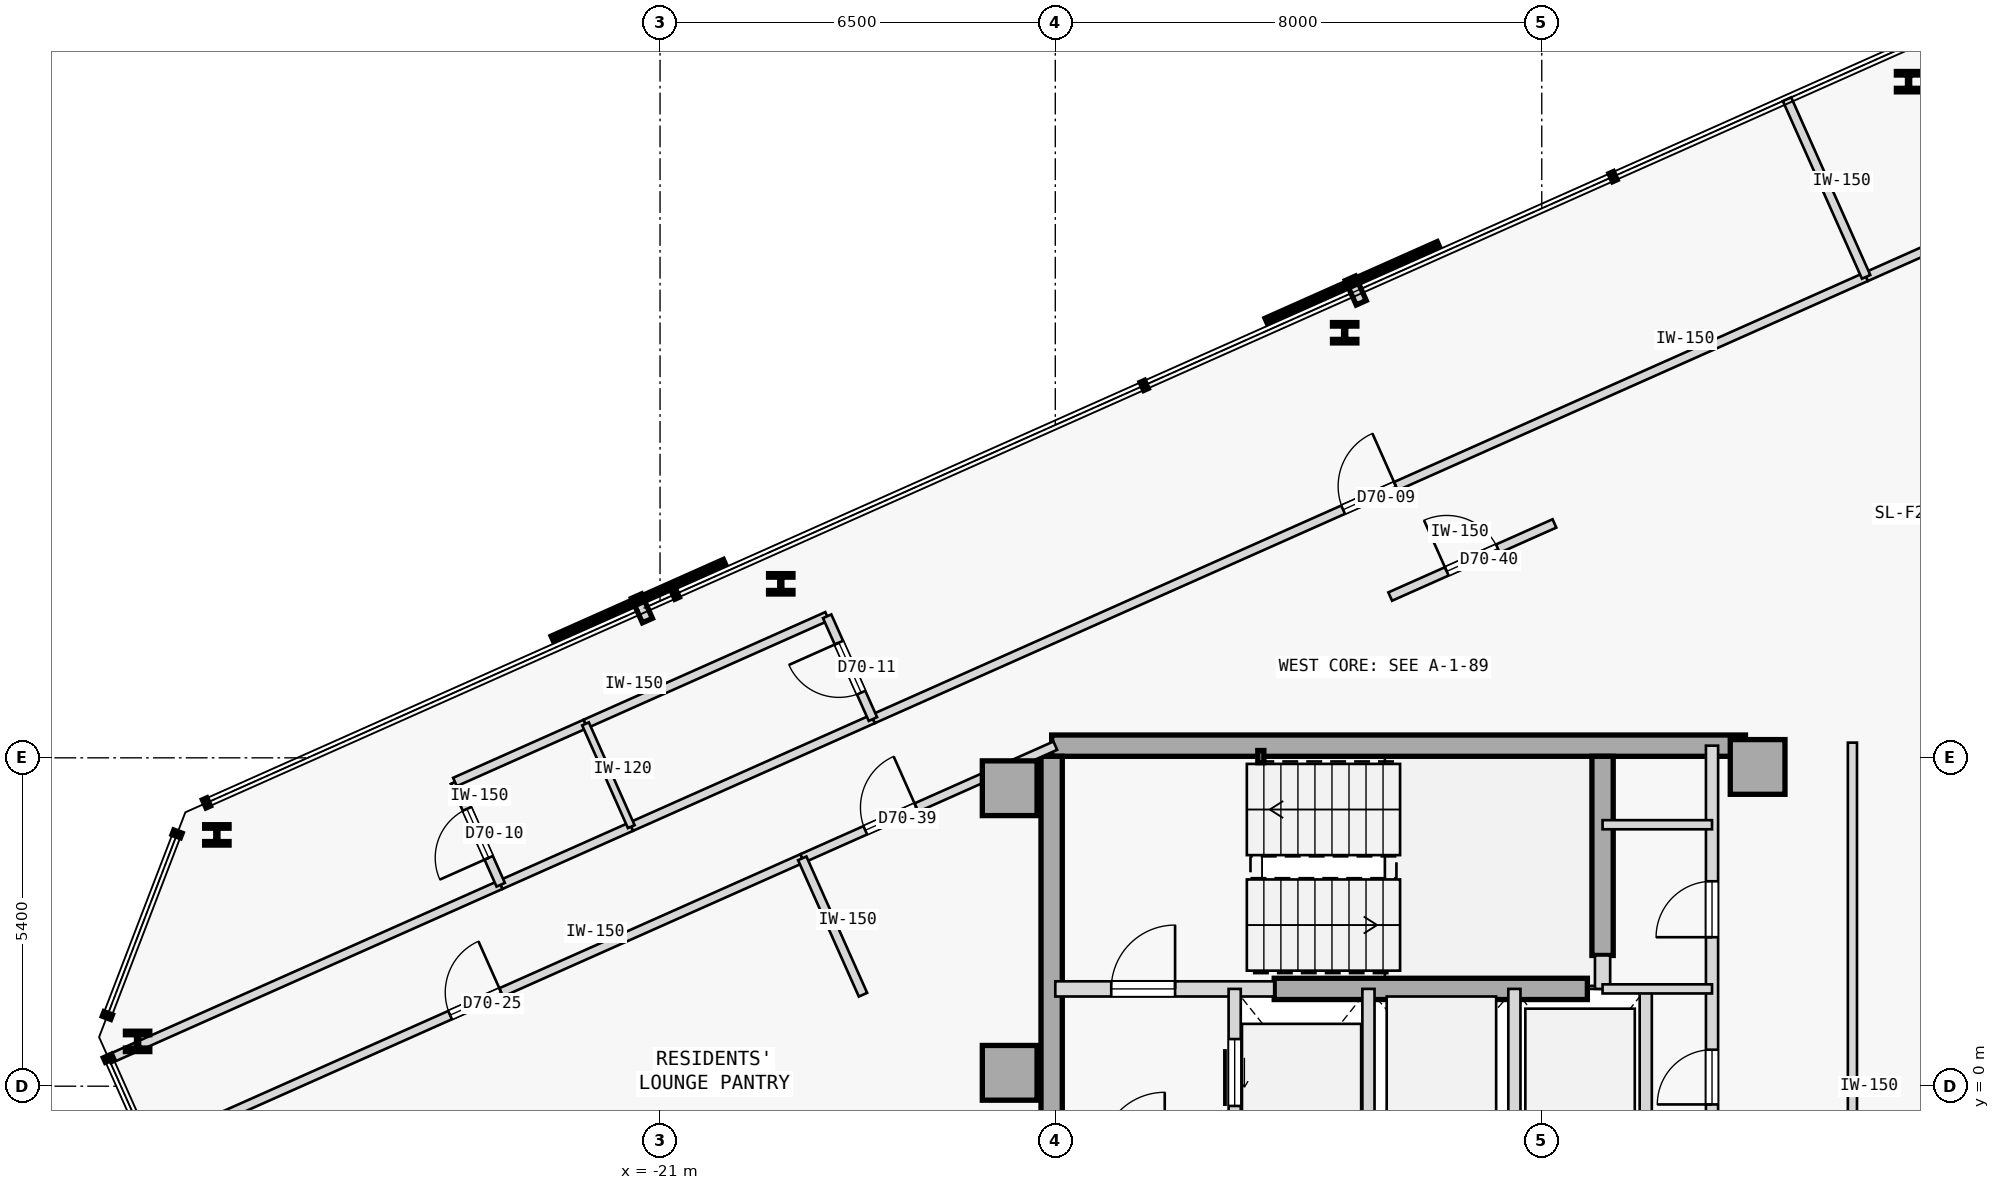
"""IFC4 building model, lengths in metres.
Left out: names, types, materials, properties, quantities, classifications, styles, units other than length and angle.
Written with IfcOpenShell. Run it as: python <this file> out.ifc"""

import sys

from ifc_helpers import new_model, si_unit, direction, frame, frame_2d, origin, origin_2d, place, context, subcontext, project, spatial, rectangle, hollow_rectangle, i_section, extrude, element, fill, save


model = new_model("IFC4")
c1 = context("Model", 3, precision=1e-05, world=origin(), true_north=direction((0.0, 1.0)))
c2 = subcontext(c1, "Body", "Model", "MODEL_VIEW")
j1 = project(units=[si_unit("LENGTHUNIT", "METRE"), si_unit("PLANEANGLEUNIT", "RADIAN")], contexts=[c1])
p1 = place(None, origin())
s1 = spatial("IfcSite", under=j1, at=p1, CompositionType="ELEMENT")
p2 = place(p1, origin())
s2 = spatial("IfcBuilding", under=s1, at=p2, CompositionType="ELEMENT")
p3 = place(p2, frame((0.0, 0.0, 262.2)))
s3 = spatial("IfcBuildingStorey", under=s2, at=p3, CompositionType="ELEMENT", Elevation=262.2)
for number, where, z_axis, x_axis in (
    (1, (-15.25, 4.9, 0.0), (0.0, 0.0, 1.0), (1.0, 0.0, 0.0)),
    (2, (-15.25, 0.22, 0.0), (0.0, 0.0, 1.0), (1.0, 0.0, 0.0)),
    (3, (-2.95, 5.25, 0.0), (0.0, 0.0, 1.0), (1.0, 0.0, 0.0)),
):
    element("IfcColumn", number, at=place(p3, frame(where, z_axis=z_axis, x_axis=x_axis)), inside=s3, PredefinedType="COLUMN", context=c2, shape_type="SweptSolid", body=[
        extrude(rectangle(XDim=0.9, YDim=0.9, at=origin_2d()), origin(), (0.0, 0.0, 1.0), 3.35),
    ])
p4 = place(p3, frame((-14.56, 5.6, 0.0), z_axis=(0.0, 0.0, 1.0), x_axis=(1.0, 0.0, 0.0)))
e4 = element("IfcWall", 4, at=p4, inside=s3, PredefinedType="SHEAR", context=c2, shape_type="SweptSolid", body=[
    extrude(rectangle(XDim=11.41, YDim=0.35, at=frame_2d((5.705, 0.0))), origin(), (0.0, 0.0, 1.0), 3.125),
])
p5 = place(p3, frame((-14.56, -5.425, 0.0), z_axis=(0.0, 0.0, 1.0), x_axis=(0.0, 1.0, 0.0)))
e5 = element("IfcWall", 5, at=p5, inside=s3, PredefinedType="SHEAR", context=c2, shape_type="SweptSolid", body=[
    extrude(rectangle(XDim=10.85, YDim=0.35, at=frame_2d((5.425, 0.0))), origin(), (0.0, 0.0, 1.0), 3.125),
])
p6 = place(p3, frame((-5.5, 2.15, 0.0), z_axis=(0.0, 0.0, 1.0), x_axis=(0.0, 1.0, 0.0)))
e6 = element("IfcWall", 6, at=p6, inside=s3, PredefinedType="SHEAR", context=c2, shape_type="SweptSolid", body=[
    extrude(rectangle(XDim=3.275, YDim=0.35, at=frame_2d((1.638, 0.0))), origin(), (0.0, 0.0, 1.0), 3.125),
])
p7 = place(p3, frame((-10.9, 1.6, 0.0), z_axis=(0.0, 0.0, 1.0), x_axis=(1.0, 0.0, 0.0)))
e7 = element("IfcWall", 7, at=p7, inside=s3, PredefinedType="SHEAR", context=c2, shape_type="SweptSolid", body=[
    extrude(rectangle(XDim=5.15, YDim=0.35, at=frame_2d((2.575, 0.0))), origin(), (0.0, 0.0, 1.0), 3.125),
])
p8 = place(p3, frame((-11.12, 5.42, 0.0), z_axis=(0.0, 0.0, 1.0), x_axis=(1.0, 0.0, 0.0)))
e8 = element("IfcColumn", 8, at=p8, inside=s3, PredefinedType="COLUMN", context=c2, shape_type="SweptSolid", body=[
    extrude(hollow_rectangle(XDim=0.1, YDim=0.2, WallThickness=0.008, at=origin_2d()), origin(), (0.0, 0.0, 1.0), 3.35),
])
for number, where, z_axis, x_axis in (
    (9, (-0.468, 16.519, 0.0), (0.0, 0.0, 1.0), (1.0, 0.0, 0.0)),
    (10, (-9.741, 12.39, 0.0), (0.0, 0.0, 1.0), (1.0, 0.0, 0.0)),
    (11, (-19.015, 8.262, 0.0), (0.0, 0.0, 1.0), (1.0, 0.0, 0.0)),
    (12, (-28.288, 4.133, 0.0), (0.0, 0.0, 1.0), (1.0, 0.0, 0.0)),
    (13, (-29.592, 0.737, 0.0), (0.0, 0.0, 1.0), (1.0, 0.0, 0.0)),
):
    element("IfcColumn", number, at=place(p3, frame(where, z_axis=z_axis, x_axis=x_axis)), inside=s3, PredefinedType="COLUMN", context=c2, shape_type="SweptSolid", body=[
        extrude(i_section(OverallWidth=0.401, OverallDepth=0.335, WebThickness=0.036, FlangeThickness=0.058, FilletRadius=0.015, at=origin_2d()), origin(), (0.0, 0.0, 1.0), 3.35),
    ])
p9 = place(p3, frame((-14.5, 1.6, 0.0), z_axis=(0.0, 0.0, 1.0), x_axis=(1.0, 0.0, 0.0)))
e14 = element("IfcWall", 14, at=p9, inside=s3, PredefinedType="STANDARD", context=c2, shape_type="SweptSolid", body=[
    extrude(rectangle(XDim=3.6, YDim=0.25, at=frame_2d((1.8, 0.0))), origin(), (0.0, 0.0, 1.0), 3.125),
])
p10 = place(p9, frame((0.92, 0.0, 0.0)))
e15 = element("IfcOpeningElement", 15, at=p10, cuts=e14, PredefinedType="OPENING", context=c2, shape_type="SweptSolid", body=[
    extrude(rectangle(XDim=1.05, YDim=2.15, at=frame_2d((0.525, 1.075))), frame((0.0, 0.135, 0.0), z_axis=(0.0, -1.0, 0.0), x_axis=(1.0, 0.0, 0.0)), (0.0, 0.0, 1.0), 0.27),
])
p11 = place(p3, frame((-5.5, 1.6, 0.0), z_axis=(0.0, 0.0, 1.0), x_axis=(0.0, 1.0, 0.0)))
e16 = element("IfcWall", 16, at=p11, inside=s3, PredefinedType="STANDARD", context=c2, shape_type="SweptSolid", body=[
    extrude(rectangle(XDim=0.55, YDim=0.25, at=frame_2d((0.275, 0.0))), origin(), (0.0, 0.0, 1.0), 3.125),
])
p12 = place(p3, frame((-3.7, -1.15, 0.0), z_axis=(0.0, 0.0, 1.0), x_axis=(0.0, 1.0, 0.0)))
e17 = element("IfcWall", 17, at=p12, inside=s3, PredefinedType="STANDARD", context=c2, shape_type="SweptSolid", body=[
    extrude(rectangle(XDim=6.75, YDim=0.2, at=frame_2d((3.375, 0.0))), origin(), (0.0, 0.0, 1.0), 3.125),
])
p13 = place(p12, frame((3.6, 0.0, 0.0)))
e18 = element("IfcOpeningElement", 18, at=p13, cuts=e17, PredefinedType="OPENING", context=c2, shape_type="SweptSolid", body=[
    extrude(rectangle(XDim=0.92, YDim=2.15, at=frame_2d((0.46, 1.075))), frame((0.0, 0.11, 0.0), z_axis=(0.0, -1.0, 0.0), x_axis=(1.0, 0.0, 0.0)), (0.0, 0.0, 1.0), 0.22),
])
p14 = place(p12, frame((0.85, 0.0, 0.0)))
e19 = element("IfcOpeningElement", 19, at=p14, cuts=e17, PredefinedType="OPENING", context=c2, shape_type="SweptSolid", body=[
    extrude(rectangle(XDim=0.9, YDim=2.15, at=frame_2d((0.45, 1.075))), frame((0.0, 0.11, 0.0), z_axis=(0.0, -1.0, 0.0), x_axis=(1.0, 0.0, 0.0)), (0.0, 0.0, 1.0), 0.22),
])
p15 = place(p3, frame((-11.55, -1.15, 0.0), z_axis=(0.0, 0.0, 1.0), x_axis=(0.0, 1.0, 0.0)))
e20 = element("IfcWall", 20, at=p15, inside=s3, PredefinedType="STANDARD", context=c2, shape_type="SweptSolid", body=[
    extrude(rectangle(XDim=2.75, YDim=0.2, at=frame_2d((1.375, 0.0))), origin(), (0.0, 0.0, 1.0), 3.125),
])
p16 = place(p15, frame((0.825, 0.0, 0.0)))
e21 = element("IfcOpeningElement", 21, at=p16, cuts=e20, PredefinedType="OPENING", context=c2, shape_type="SweptSolid", body=[
    extrude(rectangle(XDim=1.1, YDim=2.15, at=frame_2d((0.55, 1.075))), frame((0.0, 0.11, 0.0), z_axis=(0.0, -1.0, 0.0), x_axis=(1.0, 0.0, 0.0)), (0.0, 0.0, 1.0), 0.22),
])
for number, where, z_axis, x_axis in (
    (22, (-9.35, -1.15, 0.0), (0.0, 0.0, 1.0), (0.0, 1.0, 0.0)),
    (23, (-6.95, -1.15, 0.0), (0.0, 0.0, 1.0), (0.0, 1.0, 0.0)),
    (24, (-4.79, -1.15, 0.0), (0.0, 0.0, 1.0), (0.0, 1.0, 0.0)),
):
    element("IfcWall", number, at=place(p3, frame(where, z_axis=z_axis, x_axis=x_axis)), inside=s3, PredefinedType="STANDARD", context=c2, shape_type="SweptSolid", body=[
        extrude(rectangle(XDim=2.75, YDim=0.2, at=frame_2d((1.375, 0.0))), origin(), (0.0, 0.0, 1.0), 3.125),
    ])
for number, where, z_axis, x_axis in (
    (25, (-5.5, 4.3, 0.0), (0.0, 0.0, 1.0), (1.0, 0.0, 0.0)),
    (26, (-5.5, 1.6, 0.0), (0.0, 0.0, 1.0), (1.0, 0.0, 0.0)),
):
    element("IfcWall", number, at=place(p3, frame(where, z_axis=z_axis, x_axis=x_axis)), inside=s3, PredefinedType="PARTITIONING", context=c2, shape_type="SweptSolid", body=[
        extrude(rectangle(XDim=1.8, YDim=0.15, at=frame_2d((0.9, 0.0))), origin(), (0.0, 0.0, 1.0), 3.125),
    ])
p17 = place(p3, frame((-1.391, -5.65, 0.0), z_axis=(0.0, 0.0, 1.0), x_axis=(-2.1605738e-05, 0.999999999767, 0.0)))
e27 = element("IfcWall", 27, at=p17, inside=s3, PredefinedType="PARTITIONING", context=c2, shape_type="SweptSolid", body=[
    extrude(rectangle(XDim=11.3, YDim=0.15, at=frame_2d((5.65, 0.0))), origin(), (0.0, 0.0, 1.0), 3.125),
])
p18 = place(p3, frame((-30.063, 0.444, 0.0), z_axis=(0.0, 0.0, 1.0), x_axis=(0.91354584652, 0.406735769642, 0.0)))
e28 = element("IfcWall", 28, at=p18, inside=s3, PredefinedType="PARTITIONING", context=c2, shape_type="SweptSolid", body=[
    extrude(rectangle(XDim=7.053, YDim=0.15, at=frame_2d((3.526, 0.0))), origin(), (0.0, 0.0, 1.0), 3.125),
])
p19 = place(p3, frame((-17.499, 6.038, 0.0), z_axis=(0.0, 0.0, 1.0), x_axis=(0.913541623157, 0.406745255362, 0.0)))
e29 = element("IfcWall", 29, at=p19, inside=s3, PredefinedType="PARTITIONING", context=c2, shape_type="SweptSolid", body=[
    extrude(rectangle(XDim=17.879, YDim=0.15, at=frame_2d((8.939, 0.0))), origin(), (0.0, 0.0, 1.0), 3.125),
])
p20 = place(p19, frame((8.465, 0.0, 0.0)))
e30 = element("IfcOpeningElement", 30, at=p20, cuts=e29, PredefinedType="OPENING", context=c2, shape_type="SweptSolid", body=[
    extrude(rectangle(XDim=0.95, YDim=2.15, at=frame_2d((0.475, 1.075))), frame((0.0, 0.085, 0.0), z_axis=(0.0, -1.0, 0.0), x_axis=(1.0, 0.0, 0.0)), (0.0, 0.0, 1.0), 0.17),
])
p21 = place(p3, frame((-23.62, 3.312, 0.0), z_axis=(0.0, 0.0, 1.0), x_axis=(0.913558622212, 0.406707073682, 0.0)))
e31 = element("IfcWall", 31, at=p21, inside=s3, PredefinedType="PARTITIONING", context=c2, shape_type="SweptSolid", body=[
    extrude(rectangle(XDim=2.35, YDim=0.15, at=frame_2d((1.175, 0.0))), origin(), (0.0, 0.0, 1.0), 3.125),
])
p22 = place(p3, frame((-21.473, 4.268, 0.0), z_axis=(0.0, 0.0, 1.0), x_axis=(0.913545193015, 0.406737237438, 0.0)))
e32 = element("IfcWall", 32, at=p22, inside=s3, PredefinedType="PARTITIONING", context=c2, shape_type="SweptSolid", body=[
    extrude(rectangle(XDim=4.35, YDim=0.15, at=frame_2d((2.175, 0.0))), origin(), (0.0, 0.0, 1.0), 3.125),
])
p23 = place(p3, frame((-1.166, 13.31, 0.0), z_axis=(0.0, 0.0, 1.0), x_axis=(0.913554005831, 0.406717442988, 0.0)))
e33 = element("IfcWall", 33, at=p23, inside=s3, PredefinedType="PARTITIONING", context=c2, shape_type="SweptSolid", body=[
    extrude(rectangle(XDim=5.555, YDim=0.15, at=frame_2d((2.777, 0.0))), origin(), (0.0, 0.0, 1.0), 3.125),
])
p24 = place(p3, frame((-29.404, -1.036, 0.0), z_axis=(0.0, 0.0, 1.0), x_axis=(0.913544247064, 0.406739362069, 0.0)))
e34 = element("IfcWall", 34, at=p24, inside=s3, PredefinedType="PARTITIONING", context=c2, shape_type="SweptSolid", body=[
    extrude(rectangle(XDim=11.76, YDim=0.15, at=frame_2d((5.88, 0.0))), origin(), (0.0, 0.0, 1.0), 3.125),
])
p25 = place(p24, frame((5.42, 0.0, 0.0)))
e35 = element("IfcOpeningElement", 35, at=p25, cuts=e34, PredefinedType="OPENING", context=c2, shape_type="SweptSolid", body=[
    extrude(rectangle(XDim=0.92, YDim=2.15, at=frame_2d((0.46, 1.075))), frame((0.0, 0.085, 0.0), z_axis=(0.0, -1.0, 0.0), x_axis=(1.0, 0.0, 0.0)), (0.0, 0.0, 1.0), 0.17),
])
p26 = place(p3, frame((-18.661, 3.747, 0.0), z_axis=(0.0, 0.0, 1.0), x_axis=(0.913535055583, 0.40676000568, 0.0)))
e36 = element("IfcWall", 36, at=p26, inside=s3, PredefinedType="PARTITIONING", context=c2, shape_type="SweptSolid", body=[
    extrude(rectangle(XDim=4.555, YDim=0.15, at=frame_2d((2.277, 0.0))), origin(), (0.0, 0.0, 1.0), 3.125),
])
p27 = place(p26, frame((1.134, 0.0, 0.0)))
e37 = element("IfcOpeningElement", 37, at=p27, cuts=e36, PredefinedType="OPENING", context=c2, shape_type="SweptSolid", body=[
    extrude(rectangle(XDim=0.92, YDim=2.15, at=frame_2d((0.46, 1.075))), frame((0.0, 0.085, 0.0), z_axis=(0.0, -1.0, 0.0), x_axis=(1.0, 0.0, 0.0)), (0.0, 0.0, 1.0), 0.17),
])
p28 = place(p3, frame((-8.992, 8.052, 0.0), z_axis=(0.0, 0.0, 1.0), x_axis=(0.913535467925, 0.406759079607, 0.0)))
e38 = element("IfcWall", 38, at=p28, inside=s3, PredefinedType="PARTITIONING", context=c2, shape_type="SweptSolid", body=[
    extrude(rectangle(XDim=2.956, YDim=0.15, at=frame_2d((1.478, 0.0))), origin(), (0.0, 0.0, 1.0), 3.125),
])
p29 = place(p28, frame((1.018, 0.0, 0.0)))
e39 = element("IfcOpeningElement", 39, at=p29, cuts=e38, PredefinedType="OPENING", context=c2, shape_type="SweptSolid", body=[
    extrude(rectangle(XDim=0.92, YDim=2.15, at=frame_2d((0.46, 1.075))), frame((0.0, 0.085, 0.0), z_axis=(0.0, -1.0, 0.0), x_axis=(1.0, 0.0, 0.0)), (0.0, 0.0, 1.0), 0.17),
])
p30 = place(p3, frame((-23.62, 3.312, 0.0), z_axis=(0.0, 0.0, 1.0), x_axis=(-0.406701600856, 0.913561058639, 0.0)))
e40 = element("IfcWall", 40, at=p30, inside=s3, PredefinedType="PARTITIONING", context=c2, shape_type="SweptSolid", body=[
    extrude(rectangle(XDim=1.85, YDim=0.15, at=frame_2d((0.925, 0.0))), origin(), (0.0, 0.0, 1.0), 3.125),
])
p31 = place(p30, frame((0.485, 0.0, 0.0)))
e41 = element("IfcOpeningElement", 41, at=p31, cuts=e40, PredefinedType="OPENING", context=c2, shape_type="SweptSolid", body=[
    extrude(rectangle(XDim=0.88, YDim=2.15, at=frame_2d((0.44, 1.075))), frame((0.0, 0.085, 0.0), z_axis=(0.0, -1.0, 0.0), x_axis=(1.0, 0.0, 0.0)), (0.0, 0.0, 1.0), 0.17),
])
p32 = place(p3, frame((-24.373, 5.003, 0.0), z_axis=(0.0, 0.0, 1.0), x_axis=(0.913558622212, 0.406707073682, 0.0)))
e42 = element("IfcWall", 42, at=p32, inside=s3, PredefinedType="PARTITIONING", context=c2, shape_type="SweptSolid", body=[
    extrude(rectangle(XDim=2.35, YDim=0.15, at=frame_2d((1.175, 0.0))), origin(), (0.0, 0.0, 1.0), 3.125),
])
p33 = place(p3, frame((-22.226, 5.958, 0.0), z_axis=(0.0, 0.0, 1.0), x_axis=(0.913545193015, 0.406737237438, 0.0)))
e43 = element("IfcWall", 43, at=p33, inside=s3, PredefinedType="PARTITIONING", context=c2, shape_type="SweptSolid", body=[
    extrude(rectangle(XDim=4.35, YDim=0.15, at=frame_2d((2.175, 0.0))), origin(), (0.0, 0.0, 1.0), 3.125),
])
p34 = place(p3, frame((-17.499, 6.038, 0.0), z_axis=(0.0, 0.0, 1.0), x_axis=(-0.406701600856, 0.913561058639, 0.0)))
e44 = element("IfcWall", 44, at=p34, inside=s3, PredefinedType="PARTITIONING", context=c2, shape_type="SweptSolid", body=[
    extrude(rectangle(XDim=1.85, YDim=0.15, at=frame_2d((0.925, 0.0))), origin(), (0.0, 0.0, 1.0), 3.125),
])
p35 = place(p34, frame((0.475, 0.0, 0.0)))
e45 = element("IfcOpeningElement", 45, at=p35, cuts=e44, PredefinedType="OPENING", context=c2, shape_type="SweptSolid", body=[
    extrude(rectangle(XDim=0.9, YDim=2.15, at=frame_2d((0.45, 1.075))), frame((0.0, 0.085, 0.0), z_axis=(0.0, -1.0, 0.0), x_axis=(1.0, 0.0, 0.0)), (0.0, 0.0, 1.0), 0.17),
])
p36 = place(p3, frame((-1.166, 13.31, 0.0), z_axis=(0.0, 0.0, 1.0), x_axis=(-0.406761717745, 0.913534293268, 0.0)))
e46 = element("IfcWall", 46, at=p36, inside=s3, PredefinedType="PARTITIONING", context=c2, shape_type="SweptSolid", body=[
    extrude(rectangle(XDim=3.198, YDim=0.15, at=frame_2d((1.599, 0.0))), origin(), (0.0, 0.0, 1.0), 3.125),
])
p37 = place(p3, frame((-21.473, 4.268, 0.0), z_axis=(0.0, 0.0, 1.0), x_axis=(-0.406701600856, 0.913561058639, 0.0)))
e47 = element("IfcWall", 47, at=p37, inside=s3, PredefinedType="PARTITIONING", context=c2, shape_type="SweptSolid", body=[
    extrude(rectangle(XDim=1.85, YDim=0.12, at=frame_2d((0.925, 0.0))), origin(), (0.0, 0.0, 1.0), 3.125),
])
p38 = place(p3, frame((-17.663, 1.504, 0.0), z_axis=(0.0, 0.0, 1.0), x_axis=(-0.406747374275, 0.913540679729, 0.0)))
e48 = element("IfcWall", 48, at=p38, inside=s3, PredefinedType="PARTITIONING", context=c2, shape_type="SweptSolid", body=[
    extrude(rectangle(XDim=2.455, YDim=0.15, at=frame_2d((1.228, 0.0))), origin(), (0.0, 0.0, 1.0), 3.125),
])
p39 = place(p10, origin())
e49 = element("IfcDoor", 49, at=p39, inside=s3, OperationType="SINGLE_SWING_RIGHT", PredefinedType="DOOR", context=c2, shape_type="SweptSolid", body=[
    extrude(rectangle(XDim=1.05, YDim=2.15, at=frame_2d((0.525, 1.075))), frame((0.0, 0.025, 0.0), z_axis=(0.0, -1.0, 0.0), x_axis=(1.0, 0.0, 0.0)), (0.0, 0.0, 1.0), 0.05),
])
fill(e15, e49)
p40 = place(p16, origin())
e50 = element("IfcDoor", 50, at=p40, inside=s3, OperationType="SLIDING_TO_RIGHT", PredefinedType="DOOR", context=c2, shape_type="SweptSolid", body=[
    extrude(rectangle(XDim=1.1, YDim=2.15, at=frame_2d((0.55, 1.075))), frame((0.0, 0.025, 0.0), z_axis=(0.0, -1.0, 0.0), x_axis=(1.0, 0.0, 0.0)), (0.0, 0.0, 1.0), 0.05),
])
fill(e21, e50)
p41 = place(p13, origin())
e51 = element("IfcDoor", 51, at=p41, inside=s3, OperationType="SINGLE_SWING_LEFT", PredefinedType="DOOR", context=c2, shape_type="SweptSolid", body=[
    extrude(rectangle(XDim=0.92, YDim=2.15, at=frame_2d((0.46, 1.075))), frame((0.0, 0.025, 0.0), z_axis=(0.0, -1.0, 0.0), x_axis=(1.0, 0.0, 0.0)), (0.0, 0.0, 1.0), 0.05),
])
fill(e18, e51)
p42 = place(p14, origin())
e52 = element("IfcDoor", 52, at=p42, inside=s3, OperationType="SINGLE_SWING_LEFT", PredefinedType="DOOR", context=c2, shape_type="SweptSolid", body=[
    extrude(rectangle(XDim=0.9, YDim=2.15, at=frame_2d((0.45, 1.075))), frame((0.0, 0.025, 0.0), z_axis=(0.0, -1.0, 0.0), x_axis=(1.0, 0.0, 0.0)), (0.0, 0.0, 1.0), 0.05),
])
fill(e19, e52)
p43 = place(p20, origin())
e53 = element("IfcDoor", 53, at=p43, inside=s3, OperationType="SINGLE_SWING_RIGHT", PredefinedType="DOOR", context=c2, shape_type="SweptSolid", body=[
    extrude(rectangle(XDim=0.95, YDim=2.15, at=frame_2d((0.475, 1.075))), frame((0.0, 0.025, 0.0), z_axis=(0.0, -1.0, 0.0), x_axis=(1.0, 0.0, 0.0)), (0.0, 0.0, 1.0), 0.05),
])
fill(e30, e53)
p44 = place(p31, origin())
e54 = element("IfcDoor", 54, at=p44, inside=s3, OperationType="SINGLE_SWING_LEFT", PredefinedType="DOOR", context=c2, shape_type="SweptSolid", body=[
    extrude(rectangle(XDim=0.88, YDim=2.15, at=frame_2d((0.44, 1.075))), frame((0.0, 0.025, 0.0), z_axis=(0.0, -1.0, 0.0), x_axis=(1.0, 0.0, 0.0)), (0.0, 0.0, 1.0), 0.05),
])
fill(e41, e54)
p45 = place(p35, origin())
e55 = element("IfcDoor", 55, at=p45, inside=s3, OperationType="SINGLE_SWING_RIGHT", PredefinedType="DOOR", context=c2, shape_type="SweptSolid", body=[
    extrude(rectangle(XDim=0.9, YDim=2.15, at=frame_2d((0.45, 1.075))), frame((0.0, 0.025, 0.0), z_axis=(0.0, -1.0, 0.0), x_axis=(1.0, 0.0, 0.0)), (0.0, 0.0, 1.0), 0.05),
])
fill(e45, e55)
p46 = place(p25, origin())
e56 = element("IfcDoor", 56, at=p46, inside=s3, OperationType="SINGLE_SWING_RIGHT", PredefinedType="DOOR", context=c2, shape_type="SweptSolid", body=[
    extrude(rectangle(XDim=0.92, YDim=2.15, at=frame_2d((0.46, 1.075))), frame((0.0, 0.025, 0.0), z_axis=(0.0, -1.0, 0.0), x_axis=(1.0, 0.0, 0.0)), (0.0, 0.0, 1.0), 0.05),
])
fill(e35, e56)
p47 = place(p27, origin())
e57 = element("IfcDoor", 57, at=p47, inside=s3, OperationType="SINGLE_SWING_RIGHT", PredefinedType="DOOR", context=c2, shape_type="SweptSolid", body=[
    extrude(rectangle(XDim=0.92, YDim=2.15, at=frame_2d((0.46, 1.075))), frame((0.0, 0.025, 0.0), z_axis=(0.0, -1.0, 0.0), x_axis=(1.0, 0.0, 0.0)), (0.0, 0.0, 1.0), 0.05),
])
fill(e37, e57)
p48 = place(p29, origin())
e58 = element("IfcDoor", 58, at=p48, inside=s3, OperationType="SINGLE_SWING_LEFT", PredefinedType="DOOR", context=c2, shape_type="SweptSolid", body=[
    extrude(rectangle(XDim=0.92, YDim=2.15, at=frame_2d((0.46, 1.075))), frame((0.0, 0.025, 0.0), z_axis=(0.0, -1.0, 0.0), x_axis=(1.0, 0.0, 0.0)), (0.0, 0.0, 1.0), 0.05),
])
fill(e39, e58)
save(model, sys.argv[1])
